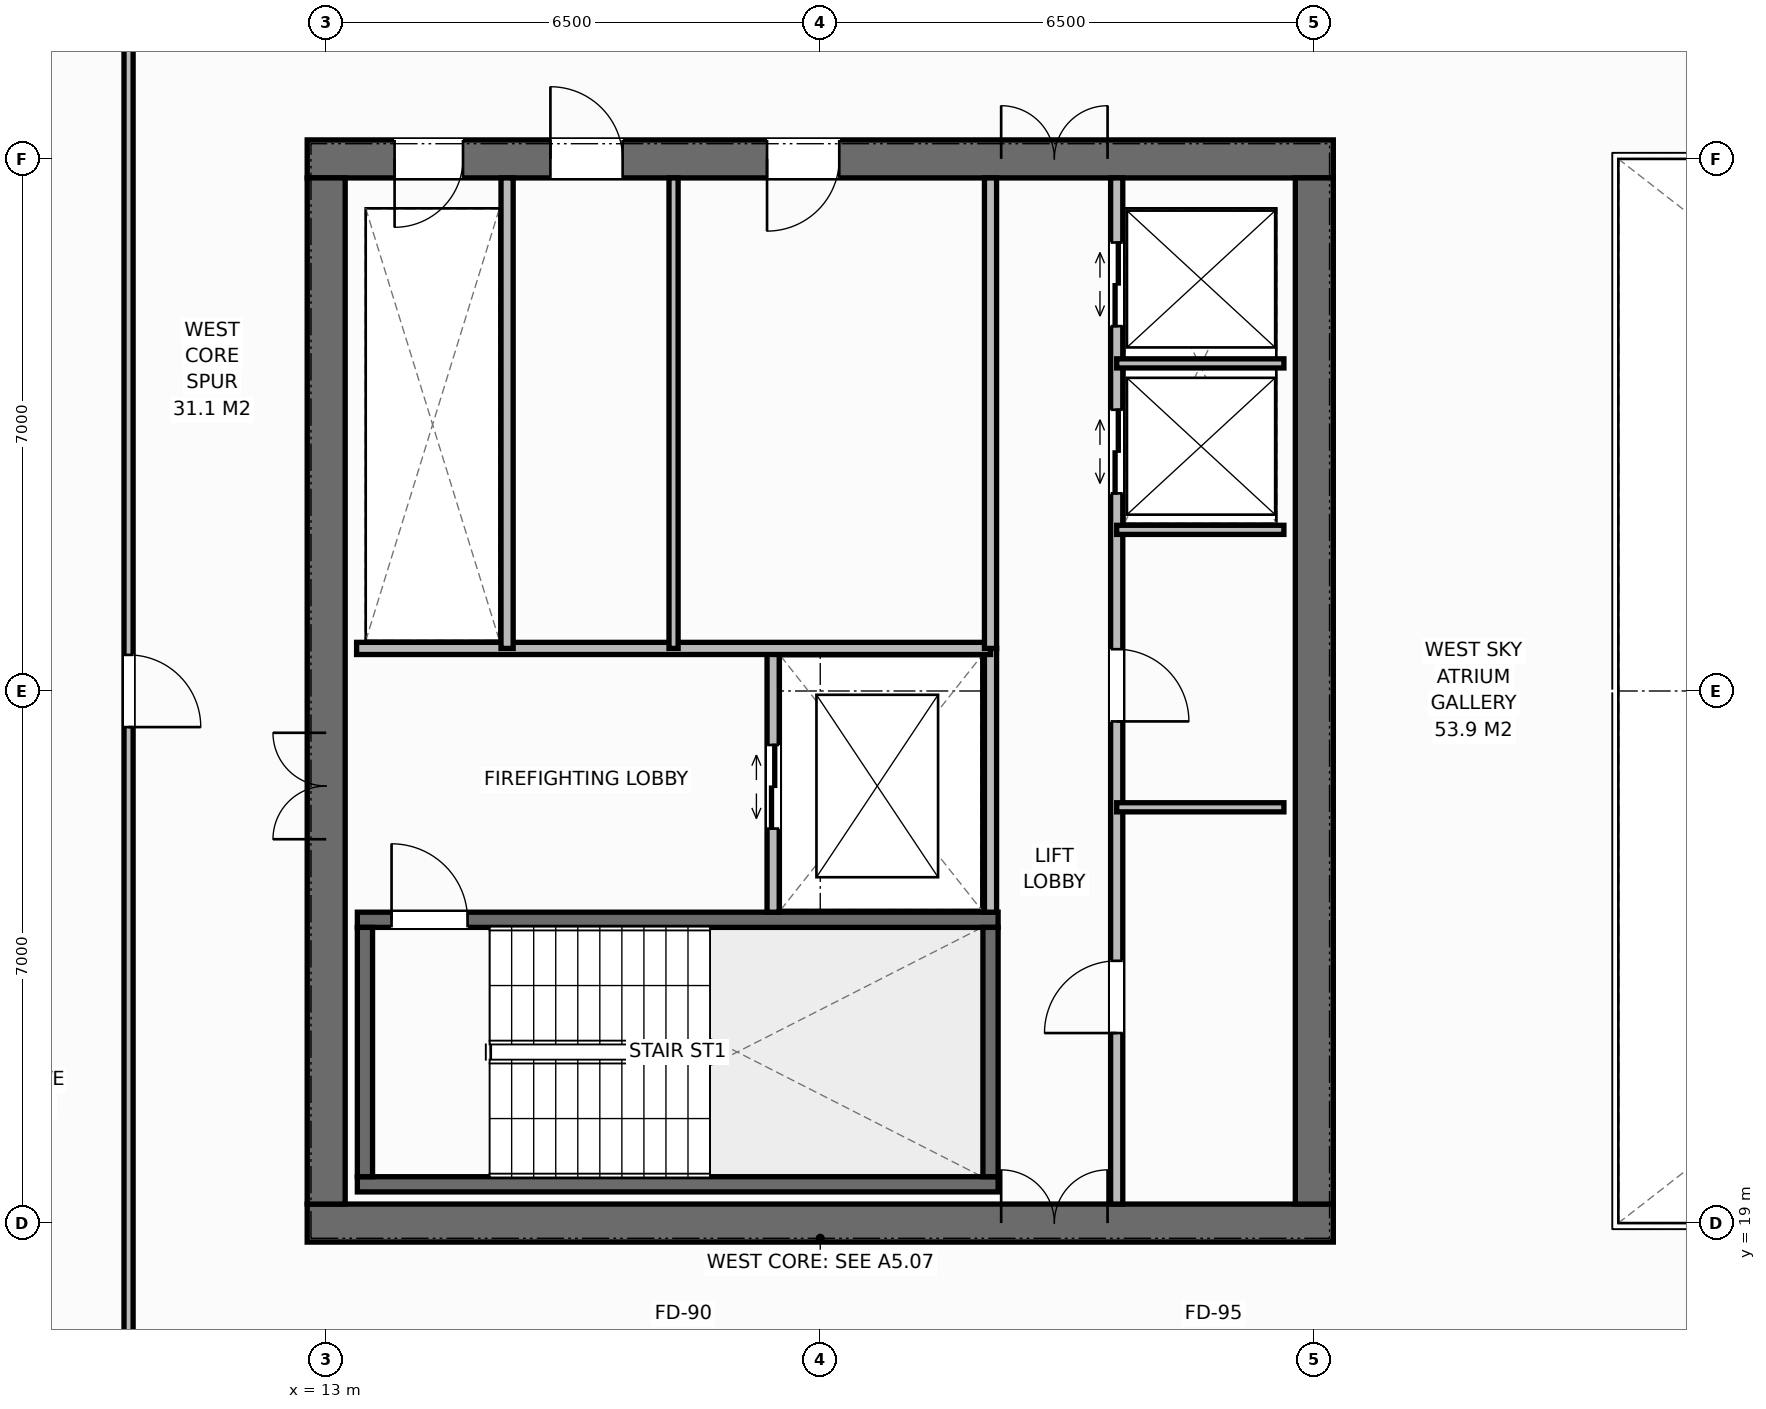
"""IFC4 building model, lengths in metres.
Left out: names, types, materials, properties, quantities, classifications, styles, units other than length and angle.
Written with IfcOpenShell. Run it as: python <this file> out.ifc"""

import sys

from ifc_helpers import new_model, si_unit, direction, frame, frame_2d, origin, place, context, subcontext, project, spatial, rectangle, extrude, element, fill, save


model = new_model("IFC4")
c1 = context("Model", 3, precision=1e-05, world=origin(), true_north=direction((0.0, 1.0)))
c2 = subcontext(c1, "Body", "Model", "MODEL_VIEW")
j1 = project(units=[si_unit("LENGTHUNIT", "METRE"), si_unit("PLANEANGLEUNIT", "RADIAN")], contexts=[c1])
p1 = place(None, origin())
s1 = spatial("IfcSite", under=j1, at=p1, CompositionType="ELEMENT")
p2 = place(p1, origin())
s2 = spatial("IfcBuilding", under=s1, at=p2, CompositionType="ELEMENT")
p3 = place(p2, frame((0.0, 0.0, 267.0)))
s3 = spatial("IfcBuildingStorey", under=s2, at=p3, CompositionType="ELEMENT", Elevation=267.0)
p4 = place(p3, frame((12.75, 19.0, 0.0), z_axis=(0.0, 0.0, 1.0), x_axis=(1.0, 0.0, 0.0)))
e1 = element("IfcWall", 1, at=p4, inside=s3, PredefinedType="SHEAR", context=c2, shape_type="SweptSolid", body=[
    extrude(rectangle(XDim=13.5, YDim=0.5, at=frame_2d((6.75, 0.0))), origin(), (0.0, 0.0, 1.0), 3.8),
])
p5 = place(p4, frame((9.13, 0.0, 0.0)))
e2 = element("IfcOpeningElement", 2, at=p5, cuts=e1, PredefinedType="OPENING", context=c2, shape_type="SweptSolid", body=[
    extrude(rectangle(XDim=1.4, YDim=2.2, at=frame_2d((0.7, 1.1))), frame((0.0, 0.26, 0.0), z_axis=(0.0, -1.0, 0.0), x_axis=(1.0, 0.0, 0.0)), (0.0, 0.0, 1.0), 0.52),
])
p6 = place(p3, frame((12.75, 33.0, 0.0), z_axis=(0.0, 0.0, 1.0), x_axis=(1.0, 0.0, 0.0)))
e3 = element("IfcWall", 3, at=p6, inside=s3, PredefinedType="SHEAR", context=c2, shape_type="SweptSolid", body=[
    extrude(rectangle(XDim=13.5, YDim=0.5, at=frame_2d((6.75, 0.0))), origin(), (0.0, 0.0, 1.0), 3.8),
])
p7 = place(p6, frame((1.15, 0.0, 0.0)))
e4 = element("IfcOpeningElement", 4, at=p7, cuts=e3, PredefinedType="OPENING", context=c2, shape_type="SweptSolid", body=[
    extrude(rectangle(XDim=0.9, YDim=2.15, at=frame_2d((0.45, 1.075))), frame((0.0, 0.26, 0.0), z_axis=(0.0, -1.0, 0.0), x_axis=(1.0, 0.0, 0.0)), (0.0, 0.0, 1.0), 0.52),
])
p8 = place(p6, frame((3.2, 0.0, 0.0)))
e5 = element("IfcOpeningElement", 5, at=p8, cuts=e3, PredefinedType="OPENING", context=c2, shape_type="SweptSolid", body=[
    extrude(rectangle(XDim=0.95, YDim=2.15, at=frame_2d((0.475, 1.075))), frame((0.0, 0.26, 0.0), z_axis=(0.0, -1.0, 0.0), x_axis=(1.0, 0.0, 0.0)), (0.0, 0.0, 1.0), 0.52),
])
p9 = place(p6, frame((6.05, 0.0, 0.0)))
e6 = element("IfcOpeningElement", 6, at=p9, cuts=e3, PredefinedType="OPENING", context=c2, shape_type="SweptSolid", body=[
    extrude(rectangle(XDim=0.95, YDim=2.15, at=frame_2d((0.475, 1.075))), frame((0.0, 0.26, 0.0), z_axis=(0.0, -1.0, 0.0), x_axis=(1.0, 0.0, 0.0)), (0.0, 0.0, 1.0), 0.52),
])
p10 = place(p6, frame((9.13, 0.0, 0.0)))
e7 = element("IfcOpeningElement", 7, at=p10, cuts=e3, PredefinedType="OPENING", context=c2, shape_type="SweptSolid", body=[
    extrude(rectangle(XDim=1.4, YDim=2.2, at=frame_2d((0.7, 1.1))), frame((0.0, 0.26, 0.0), z_axis=(0.0, -1.0, 0.0), x_axis=(1.0, 0.0, 0.0)), (0.0, 0.0, 1.0), 0.52),
])
p11 = place(p3, frame((13.0, 19.25, 0.0), z_axis=(0.0, 0.0, 1.0), x_axis=(0.0, 1.0, 0.0)))
e8 = element("IfcWall", 8, at=p11, inside=s3, PredefinedType="SHEAR", context=c2, shape_type="SweptSolid", body=[
    extrude(rectangle(XDim=13.5, YDim=0.5, at=frame_2d((6.75, 0.0))), origin(), (0.0, 0.0, 1.0), 3.8),
])
p12 = place(p11, frame((4.8, 0.0, 0.0)))
e9 = element("IfcOpeningElement", 9, at=p12, cuts=e8, PredefinedType="OPENING", context=c2, shape_type="SweptSolid", body=[
    extrude(rectangle(XDim=1.4, YDim=2.2, at=frame_2d((0.7, 1.1))), frame((0.0, 0.26, 0.0), z_axis=(0.0, -1.0, 0.0), x_axis=(1.0, 0.0, 0.0)), (0.0, 0.0, 1.0), 0.52),
])
p13 = place(p3, frame((26.0, 19.25, 0.0), z_axis=(0.0, 0.0, 1.0), x_axis=(0.0, 1.0, 0.0)))
e10 = element("IfcWall", 10, at=p13, inside=s3, PredefinedType="SHEAR", context=c2, shape_type="SweptSolid", body=[
    extrude(rectangle(XDim=13.5, YDim=0.5, at=frame_2d((6.75, 0.0))), origin(), (0.0, 0.0, 1.0), 3.8),
])
p14 = place(p3, frame((13.41, 19.51, 0.0), z_axis=(0.0, 0.0, 1.0), x_axis=(1.0, 0.0, 0.0)))
e11 = element("IfcWall", 11, at=p14, inside=s3, PredefinedType="SHEAR", context=c2, shape_type="SweptSolid", body=[
    extrude(rectangle(XDim=8.43, YDim=0.2, at=frame_2d((4.215, 0.0))), origin(), (0.0, 0.0, 1.0), 3.8),
])
p15 = place(p3, frame((13.41, 22.99, 0.0), z_axis=(0.0, 0.0, 1.0), x_axis=(1.0, 0.0, 0.0)))
e12 = element("IfcWall", 12, at=p15, inside=s3, PredefinedType="SHEAR", context=c2, shape_type="SweptSolid", body=[
    extrude(rectangle(XDim=8.43, YDim=0.2, at=frame_2d((4.215, 0.0))), origin(), (0.0, 0.0, 1.0), 3.8),
])
p16 = place(p15, frame((0.45, 0.0, 0.0)))
e13 = element("IfcOpeningElement", 13, at=p16, cuts=e12, PredefinedType="OPENING", context=c2, shape_type="SweptSolid", body=[
    extrude(rectangle(XDim=1.0, YDim=2.15, at=frame_2d((0.5, 1.075))), frame((0.0, 0.11, 0.0), z_axis=(0.0, -1.0, 0.0), x_axis=(1.0, 0.0, 0.0)), (0.0, 0.0, 1.0), 0.22),
])
for number, where, z_axis, x_axis in (
    (14, (13.51, 19.61, 0.0), (0.0, 0.0, 1.0), (0.0, 1.0, 0.0)),
    (15, (21.74, 19.61, 0.0), (0.0, 0.0, 1.0), (0.0, 1.0, 0.0)),
):
    element("IfcWall", number, at=place(p3, frame(where, z_axis=z_axis, x_axis=x_axis)), inside=s3, PredefinedType="SHEAR", context=c2, shape_type="SweptSolid", body=[
        extrude(rectangle(XDim=3.28, YDim=0.2, at=frame_2d((1.64, 0.0))), origin(), (0.0, 0.0, 1.0), 3.8),
    ])
p17 = place(p3, frame((21.74, 23.09, 0.0), z_axis=(0.0, 0.0, 1.0), x_axis=(0.0, 1.0, 0.0)))
e16 = element("IfcWall", 16, at=p17, inside=s3, PredefinedType="STANDARD", context=c2, shape_type="SweptSolid", body=[
    extrude(rectangle(XDim=3.47, YDim=0.16, at=frame_2d((1.735, 0.0))), origin(), (0.0, 0.0, 1.0), 3.588),
])
p18 = place(p3, frame((18.88, 23.09, 0.0), z_axis=(0.0, 0.0, 1.0), x_axis=(0.0, 1.0, 0.0)))
e17 = element("IfcWall", 17, at=p18, inside=s3, PredefinedType="STANDARD", context=c2, shape_type="SweptSolid", body=[
    extrude(rectangle(XDim=3.47, YDim=0.16, at=frame_2d((1.735, 0.0))), origin(), (0.0, 0.0, 1.0), 3.588),
])
p19 = place(p18, frame((1.1, 0.0, 0.0)))
e18 = element("IfcOpeningElement", 18, at=p19, cuts=e17, PredefinedType="OPENING", context=c2, shape_type="SweptSolid", body=[
    extrude(rectangle(XDim=1.1, YDim=2.2, at=frame_2d((0.55, 1.1))), frame((0.0, 0.09, 0.0), z_axis=(0.0, -1.0, 0.0), x_axis=(1.0, 0.0, 0.0)), (0.0, 0.0, 1.0), 0.18),
])
p20 = place(p3, frame((13.4, 26.56, 0.0), z_axis=(0.0, 0.0, 1.0), x_axis=(1.0, 0.0, 0.0)))
e19 = element("IfcWall", 19, at=p20, inside=s3, PredefinedType="STANDARD", context=c2, shape_type="SweptSolid", body=[
    extrude(rectangle(XDim=8.34, YDim=0.16, at=frame_2d((4.17, 0.0))), origin(), (0.0, 0.0, 1.0), 3.588),
])
p21 = place(p3, frame((15.38, 26.56, 0.0), z_axis=(0.0, 0.0, 1.0), x_axis=(0.0, 1.0, 0.0)))
e20 = element("IfcWall", 20, at=p21, inside=s3, PredefinedType="STANDARD", context=c2, shape_type="SweptSolid", body=[
    extrude(rectangle(XDim=6.19, YDim=0.16, at=frame_2d((3.095, 0.0))), origin(), (0.0, 0.0, 1.0), 3.588),
])
p22 = place(p3, frame((17.57, 26.56, 0.0), z_axis=(0.0, 0.0, 1.0), x_axis=(0.0, 1.0, 0.0)))
e21 = element("IfcWall", 21, at=p22, inside=s3, PredefinedType="PARTITIONING", context=c2, shape_type="SweptSolid", body=[
    extrude(rectangle(XDim=6.19, YDim=0.12, at=frame_2d((3.095, 0.0))), origin(), (0.0, 0.0, 1.0), 3.588),
])
p23 = place(p3, frame((21.74, 26.56, 0.0), z_axis=(0.0, 0.0, 1.0), x_axis=(0.0, 1.0, 0.0)))
e22 = element("IfcWall", 22, at=p23, inside=s3, PredefinedType="STANDARD", context=c2, shape_type="SweptSolid", body=[
    extrude(rectangle(XDim=6.19, YDim=0.16, at=frame_2d((3.095, 0.0))), origin(), (0.0, 0.0, 1.0), 3.588),
])
p24 = place(p3, frame((23.4, 19.25, 0.0), z_axis=(0.0, 0.0, 1.0), x_axis=(0.0, 1.0, 0.0)))
e23 = element("IfcWall", 23, at=p24, inside=s3, PredefinedType="STANDARD", context=c2, shape_type="SweptSolid", body=[
    extrude(rectangle(XDim=13.5, YDim=0.16, at=frame_2d((6.75, 0.0))), origin(), (0.0, 0.0, 1.0), 3.588),
])
p25 = place(p24, frame((2.25, 0.0, 0.0)))
e24 = element("IfcOpeningElement", 24, at=p25, cuts=e23, PredefinedType="OPENING", context=c2, shape_type="SweptSolid", body=[
    extrude(rectangle(XDim=0.95, YDim=2.15, at=frame_2d((0.475, 1.075))), frame((0.0, 0.09, 0.0), z_axis=(0.0, -1.0, 0.0), x_axis=(1.0, 0.0, 0.0)), (0.0, 0.0, 1.0), 0.18),
])
p26 = place(p24, frame((6.35, 0.0, 0.0)))
e25 = element("IfcOpeningElement", 25, at=p26, cuts=e23, PredefinedType="OPENING", context=c2, shape_type="SweptSolid", body=[
    extrude(rectangle(XDim=0.95, YDim=2.15, at=frame_2d((0.475, 1.075))), frame((0.0, 0.09, 0.0), z_axis=(0.0, -1.0, 0.0), x_axis=(1.0, 0.0, 0.0)), (0.0, 0.0, 1.0), 0.18),
])
p27 = place(p24, frame((9.35, 0.0, 0.0)))
e26 = element("IfcOpeningElement", 26, at=p27, cuts=e23, PredefinedType="OPENING", context=c2, shape_type="SweptSolid", body=[
    extrude(rectangle(XDim=1.1, YDim=2.2, at=frame_2d((0.55, 1.1))), frame((0.0, 0.09, 0.0), z_axis=(0.0, -1.0, 0.0), x_axis=(1.0, 0.0, 0.0)), (0.0, 0.0, 1.0), 0.18),
])
p28 = place(p24, frame((11.55, 0.0, 0.0)))
e27 = element("IfcOpeningElement", 27, at=p28, cuts=e23, PredefinedType="OPENING", context=c2, shape_type="SweptSolid", body=[
    extrude(rectangle(XDim=1.1, YDim=2.2, at=frame_2d((0.55, 1.1))), frame((0.0, 0.09, 0.0), z_axis=(0.0, -1.0, 0.0), x_axis=(1.0, 0.0, 0.0)), (0.0, 0.0, 1.0), 0.18),
])
for number, where, z_axis, x_axis in (
    (28, (23.4, 24.47, 0.0), (0.0, 0.0, 1.0), (1.0, 0.0, 0.0)),
    (29, (23.4, 28.12, 0.0), (0.0, 0.0, 1.0), (1.0, 0.0, 0.0)),
    (30, (23.4, 30.31, 0.0), (0.0, 0.0, 1.0), (1.0, 0.0, 0.0)),
):
    element("IfcWall", number, at=place(p3, frame(where, z_axis=z_axis, x_axis=x_axis)), inside=s3, PredefinedType="PARTITIONING", context=c2, shape_type="SweptSolid", body=[
        extrude(rectangle(XDim=2.2, YDim=0.12, at=frame_2d((1.1, 0.0))), origin(), (0.0, 0.0, 1.0), 3.588),
    ])
p29 = place(p3, frame((10.4, 16.5, 0.0), z_axis=(0.0, 0.0, 1.0), x_axis=(0.0, 1.0, 0.0)))
e31 = element("IfcWall", 31, at=p29, inside=s3, PredefinedType="PARTITIONING", context=c2, shape_type="SweptSolid", body=[
    extrude(rectangle(XDim=19.0, YDim=0.12, at=frame_2d((9.5, 0.0))), origin(), (0.0, 0.0, 1.0), 3.588),
])
p30 = place(p29, frame((9.025, 0.0, 0.0)))
e32 = element("IfcOpeningElement", 32, at=p30, cuts=e31, PredefinedType="OPENING", context=c2, shape_type="SweptSolid", body=[
    extrude(rectangle(XDim=0.95, YDim=2.15, at=frame_2d((0.475, 1.075))), frame((0.0, 0.07, 0.0), z_axis=(0.0, -1.0, 0.0), x_axis=(1.0, 0.0, 0.0)), (0.0, 0.0, 1.0), 0.14),
])
p31 = place(p16, origin())
e33 = element("IfcDoor", 33, at=p31, inside=s3, OperationType="SINGLE_SWING_LEFT", PredefinedType="DOOR", context=c2, shape_type="SweptSolid", body=[
    extrude(rectangle(XDim=1.0, YDim=2.15, at=frame_2d((0.5, 1.075))), frame((0.0, 0.025, 0.0), z_axis=(0.0, -1.0, 0.0), x_axis=(1.0, 0.0, 0.0)), (0.0, 0.0, 1.0), 0.05),
])
fill(e13, e33)
p32 = place(p12, origin())
e34 = element("IfcDoor", 34, at=p32, inside=s3, OperationType="DOUBLE_DOOR_SINGLE_SWING", PredefinedType="DOOR", context=c2, shape_type="SweptSolid", body=[
    extrude(rectangle(XDim=1.4, YDim=2.2, at=frame_2d((0.7, 1.1))), frame((0.0, 0.025, 0.0), z_axis=(0.0, -1.0, 0.0), x_axis=(1.0, 0.0, 0.0)), (0.0, 0.0, 1.0), 0.05),
])
fill(e9, e34)
p33 = place(p19, origin())
e35 = element("IfcDoor", 35, at=p33, inside=s3, OperationType="DOUBLE_DOOR_SLIDING", PredefinedType="DOOR", context=c2, shape_type="SweptSolid", body=[
    extrude(rectangle(XDim=1.1, YDim=2.2, at=frame_2d((0.55, 1.1))), frame((0.0, 0.025, 0.0), z_axis=(0.0, -1.0, 0.0), x_axis=(1.0, 0.0, 0.0)), (0.0, 0.0, 1.0), 0.05),
])
fill(e18, e35)
p34 = place(p7, origin())
e36 = element("IfcDoor", 36, at=p34, inside=s3, OperationType="SINGLE_SWING_RIGHT", PredefinedType="DOOR", context=c2, shape_type="SweptSolid", body=[
    extrude(rectangle(XDim=0.9, YDim=2.15, at=frame_2d((0.45, 1.075))), frame((0.0, -0.025, 0.0), z_axis=(0.0, -1.0, 0.0), x_axis=(1.0, 0.0, 0.0)), (0.0, 0.0, 1.0), 0.05),
])
fill(e4, e36)
p35 = place(p8, origin())
e37 = element("IfcDoor", 37, at=p35, inside=s3, OperationType="SINGLE_SWING_LEFT", PredefinedType="DOOR", context=c2, shape_type="SweptSolid", body=[
    extrude(rectangle(XDim=0.95, YDim=2.15, at=frame_2d((0.475, 1.075))), frame((0.0, -0.025, 0.0), z_axis=(0.0, -1.0, 0.0), x_axis=(1.0, 0.0, 0.0)), (0.0, 0.0, 1.0), 0.05),
])
fill(e5, e37)
p36 = place(p9, origin())
e38 = element("IfcDoor", 38, at=p36, inside=s3, OperationType="SINGLE_SWING_RIGHT", PredefinedType="DOOR", context=c2, shape_type="SweptSolid", body=[
    extrude(rectangle(XDim=0.95, YDim=2.15, at=frame_2d((0.475, 1.075))), frame((0.0, -0.025, 0.0), z_axis=(0.0, -1.0, 0.0), x_axis=(1.0, 0.0, 0.0)), (0.0, 0.0, 1.0), 0.05),
])
fill(e6, e38)
p37 = place(p5, origin())
e39 = element("IfcDoor", 39, at=p37, inside=s3, OperationType="DOUBLE_DOOR_SINGLE_SWING", PredefinedType="DOOR", context=c2, shape_type="SweptSolid", body=[
    extrude(rectangle(XDim=1.4, YDim=2.2, at=frame_2d((0.7, 1.1))), frame((0.0, 0.075, 0.0), z_axis=(0.0, -1.0, 0.0), x_axis=(1.0, 0.0, 0.0)), (0.0, 0.0, 1.0), 0.05),
])
fill(e2, e39)
p38 = place(p10, origin())
e40 = element("IfcDoor", 40, at=p38, inside=s3, OperationType="DOUBLE_DOOR_SINGLE_SWING", PredefinedType="DOOR", context=c2, shape_type="SweptSolid", body=[
    extrude(rectangle(XDim=1.4, YDim=2.2, at=frame_2d((0.7, 1.1))), frame((0.0, -0.025, 0.0), z_axis=(0.0, -1.0, 0.0), x_axis=(1.0, 0.0, 0.0)), (0.0, 0.0, 1.0), 0.05),
])
fill(e7, e40)
p39 = place(p25, origin())
e41 = element("IfcDoor", 41, at=p39, inside=s3, OperationType="SINGLE_SWING_LEFT", PredefinedType="DOOR", context=c2, shape_type="SweptSolid", body=[
    extrude(rectangle(XDim=0.95, YDim=2.15, at=frame_2d((0.475, 1.075))), frame((0.0, 0.025, 0.0), z_axis=(0.0, -1.0, 0.0), x_axis=(1.0, 0.0, 0.0)), (0.0, 0.0, 1.0), 0.05),
])
fill(e24, e41)
p40 = place(p26, origin())
e42 = element("IfcDoor", 42, at=p40, inside=s3, OperationType="SINGLE_SWING_RIGHT", PredefinedType="DOOR", context=c2, shape_type="SweptSolid", body=[
    extrude(rectangle(XDim=0.95, YDim=2.15, at=frame_2d((0.475, 1.075))), frame((0.0, 0.025, 0.0), z_axis=(0.0, -1.0, 0.0), x_axis=(1.0, 0.0, 0.0)), (0.0, 0.0, 1.0), 0.05),
])
fill(e25, e42)
p41 = place(p27, origin())
e43 = element("IfcDoor", 43, at=p41, inside=s3, OperationType="DOUBLE_DOOR_SLIDING", PredefinedType="DOOR", context=c2, shape_type="SweptSolid", body=[
    extrude(rectangle(XDim=1.1, YDim=2.2, at=frame_2d((0.55, 1.1))), frame((0.0, 0.025, 0.0), z_axis=(0.0, -1.0, 0.0), x_axis=(1.0, 0.0, 0.0)), (0.0, 0.0, 1.0), 0.05),
])
fill(e26, e43)
p42 = place(p28, origin())
e44 = element("IfcDoor", 44, at=p42, inside=s3, OperationType="DOUBLE_DOOR_SLIDING", PredefinedType="DOOR", context=c2, shape_type="SweptSolid", body=[
    extrude(rectangle(XDim=1.1, YDim=2.2, at=frame_2d((0.55, 1.1))), frame((0.0, 0.025, 0.0), z_axis=(0.0, -1.0, 0.0), x_axis=(1.0, 0.0, 0.0)), (0.0, 0.0, 1.0), 0.05),
])
fill(e27, e44)
p43 = place(p30, origin())
e45 = element("IfcDoor", 45, at=p43, inside=s3, OperationType="SINGLE_SWING_RIGHT", PredefinedType="DOOR", context=c2, shape_type="SweptSolid", body=[
    extrude(rectangle(XDim=0.95, YDim=2.15, at=frame_2d((0.475, 1.075))), frame((0.0, 0.025, 0.0), z_axis=(0.0, -1.0, 0.0), x_axis=(1.0, 0.0, 0.0)), (0.0, 0.0, 1.0), 0.05),
])
fill(e32, e45)
save(model, sys.argv[1])
